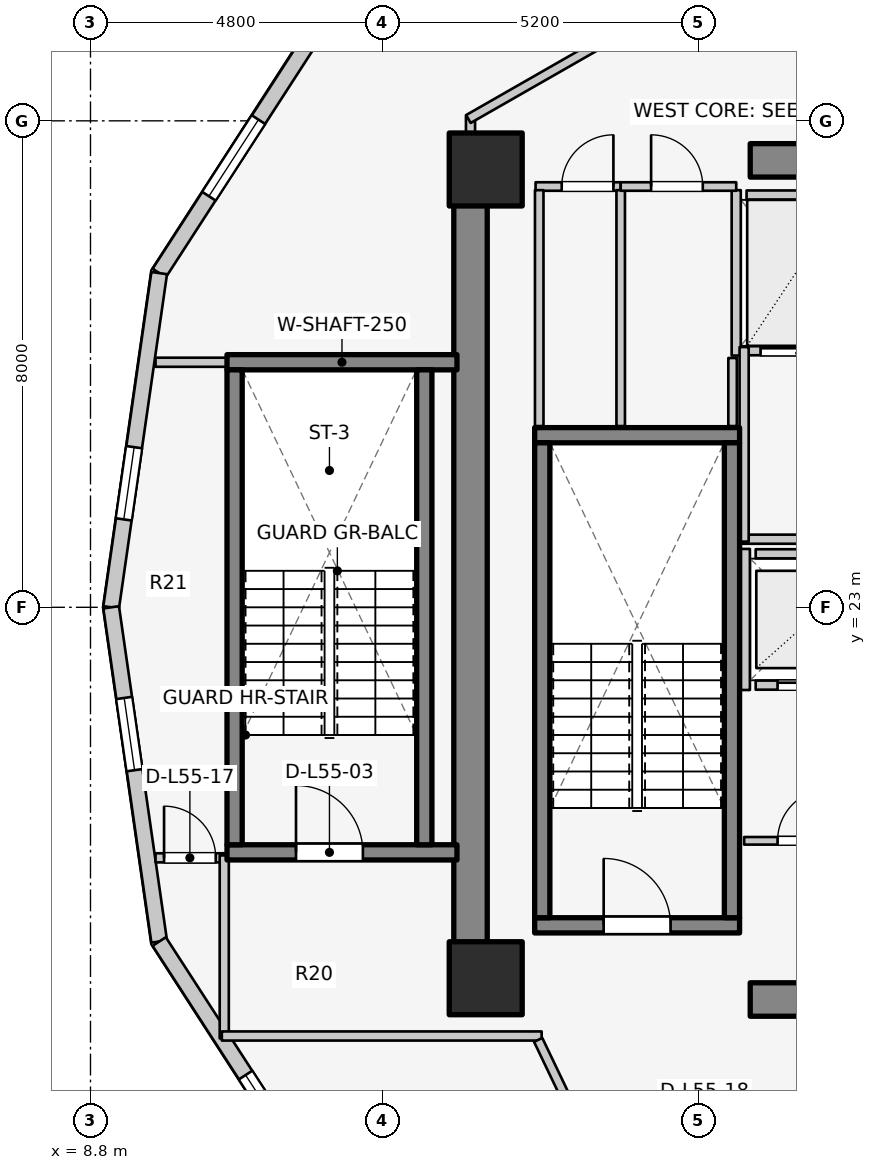
"""IFC4 building model, lengths in metres.
Left out: names, types, materials, properties, quantities, classifications, styles, units other than length and angle.
Written with IfcOpenShell. Run it as: python <this file> out.ifc"""

import sys

from ifc_helpers import new_model, si_unit, direction, frame, frame_2d, origin, origin_2d, place, context, subcontext, project, spatial, rectangle, extrude, element, fill, save


model = new_model("IFC4")
c1 = context("Model", 3, precision=1e-05, world=origin(), true_north=direction((0.0, 1.0)))
c2 = subcontext(c1, "Body", "Model", "MODEL_VIEW")
j1 = project(units=[si_unit("LENGTHUNIT", "METRE"), si_unit("PLANEANGLEUNIT", "RADIAN")], contexts=[c1])
p1 = place(None, origin())
s1 = spatial("IfcSite", under=j1, at=p1, CompositionType="ELEMENT")
p2 = place(p1, origin())
s2 = spatial("IfcBuilding", under=s1, at=p2, CompositionType="ELEMENT")
p3 = place(p2, frame((0.0, 0.0, 180.8)))
s3 = spatial("IfcBuildingStorey", under=s2, at=p3, CompositionType="ELEMENT", Elevation=180.8)
p4 = place(p3, frame((15.05, 17.05, 0.0), z_axis=(0.0, 0.0, 1.0), x_axis=(0.0, 1.0, 0.0)))
e1 = element("IfcWall", 1, at=p4, inside=s3, PredefinedType="SHEAR", context=c2, shape_type="SweptSolid", body=[
    extrude(rectangle(XDim=12.8, YDim=0.55, at=frame_2d((6.4, 0.0))), origin(), (0.0, 0.0, 1.0), 3.1),
])
for number, where, z_axis, x_axis in (
    (2, (19.65, 16.55, 0.0), (0.0, 0.0, 1.0), (1.0, 0.0, 0.0)),
    (3, (19.65, 30.35, 0.0), (0.0, 0.0, 1.0), (1.0, 0.0, 0.0)),
):
    element("IfcWall", number, at=place(p3, frame(where, z_axis=z_axis, x_axis=x_axis)), inside=s3, PredefinedType="SHEAR", context=c2, shape_type="SweptSolid", body=[
        extrude(rectangle(XDim=4.5, YDim=0.55, at=frame_2d((2.25, 0.0))), origin(), (0.0, 0.0, 1.0), 3.1),
    ])
p5 = place(p3, frame((16.105, 17.77, 0.0), z_axis=(0.0, 0.0, 1.0), x_axis=(1.0, 0.0, 0.0)))
e4 = element("IfcWall", 4, at=p5, inside=s3, PredefinedType="SOLIDWALL", context=c2, shape_type="SweptSolid", body=[
    extrude(rectangle(XDim=3.37, YDim=0.25, at=frame_2d((1.685, 0.0))), origin(), (0.0, 0.0, 1.0), 3.1),
])
p6 = place(p5, frame((1.135, 0.0, 0.0)))
e5 = element("IfcOpeningElement", 5, at=p6, cuts=e4, PredefinedType="OPENING", context=c2, shape_type="SweptSolid", body=[
    extrude(rectangle(XDim=1.1, YDim=2.1, at=frame_2d((0.55, 1.05))), frame((0.0, 0.135, 0.0), z_axis=(0.0, -1.0, 0.0), x_axis=(1.0, 0.0, 0.0)), (0.0, 0.0, 1.0), 0.27),
])
p7 = place(p3, frame((16.105, 25.83, 0.0), z_axis=(0.0, 0.0, 1.0), x_axis=(1.0, 0.0, 0.0)))
e6 = element("IfcWall", 6, at=p7, inside=s3, PredefinedType="SOLIDWALL", context=c2, shape_type="SweptSolid", body=[
    extrude(rectangle(XDim=3.37, YDim=0.25, at=frame_2d((1.685, 0.0))), origin(), (0.0, 0.0, 1.0), 3.1),
])
for number, where, z_axis, x_axis in (
    (7, (16.23, 17.895, 0.0), (0.0, 0.0, 1.0), (0.0, 1.0, 0.0)),
    (8, (19.35, 17.895, 0.0), (0.0, 0.0, 1.0), (0.0, 1.0, 0.0)),
):
    element("IfcWall", number, at=place(p3, frame(where, z_axis=z_axis, x_axis=x_axis)), inside=s3, PredefinedType="SOLIDWALL", context=c2, shape_type="SweptSolid", body=[
        extrude(rectangle(XDim=7.81, YDim=0.25, at=frame_2d((3.905, 0.0))), origin(), (0.0, 0.0, 1.0), 3.1),
    ])
p8 = place(p3, frame((11.045, 18.97, 0.0), z_axis=(0.0, 0.0, 1.0), x_axis=(1.0, 0.0, 0.0)))
e9 = element("IfcWall", 9, at=p8, inside=s3, PredefinedType="SOLIDWALL", context=c2, shape_type="SweptSolid", body=[
    extrude(rectangle(XDim=3.782, YDim=0.25, at=frame_2d((1.891, 0.0))), origin(), (0.0, 0.0, 1.0), 3.1),
])
p9 = place(p8, frame((1.135, 0.0, 0.0)))
e10 = element("IfcOpeningElement", 10, at=p9, cuts=e9, PredefinedType="OPENING", context=c2, shape_type="SweptSolid", body=[
    extrude(rectangle(XDim=1.1, YDim=2.1, at=frame_2d((0.55, 1.05))), frame((0.0, 0.135, 0.0), z_axis=(0.0, -1.0, 0.0), x_axis=(1.0, 0.0, 0.0)), (0.0, 0.0, 1.0), 0.27),
])
p10 = place(p3, frame((11.045, 27.03, 0.0), z_axis=(0.0, 0.0, 1.0), x_axis=(1.0, 0.0, 0.0)))
e11 = element("IfcWall", 11, at=p10, inside=s3, PredefinedType="SOLIDWALL", context=c2, shape_type="SweptSolid", body=[
    extrude(rectangle(XDim=3.782, YDim=0.25, at=frame_2d((1.891, 0.0))), origin(), (0.0, 0.0, 1.0), 3.1),
])
for number, where, z_axis, x_axis in (
    (12, (11.17, 19.095, 0.0), (0.0, 0.0, 1.0), (0.0, 1.0, 0.0)),
    (13, (14.29, 19.095, 0.0), (0.0, 0.0, 1.0), (0.0, 1.0, 0.0)),
):
    element("IfcWall", number, at=place(p3, frame(where, z_axis=z_axis, x_axis=x_axis)), inside=s3, PredefinedType="SOLIDWALL", context=c2, shape_type="SweptSolid", body=[
        extrude(rectangle(XDim=7.81, YDim=0.25, at=frame_2d((3.905, 0.0))), origin(), (0.0, 0.0, 1.0), 3.1),
    ])
for number, where, z_axis, x_axis in (
    (14, (15.3, 16.9, 0.0), (0.0, 0.0, 1.0), (1.0, 0.0, 0.0)),
    (15, (15.3, 30.2, 0.0), (0.0, 0.0, 1.0), (1.0, 0.0, 0.0)),
):
    element("IfcColumn", number, at=place(p3, frame(where, z_axis=z_axis, x_axis=x_axis)), inside=s3, PredefinedType="COLUMN", context=c2, shape_type="SweptSolid", body=[
        extrude(rectangle(XDim=1.2, YDim=1.2, at=origin_2d()), origin(), (0.0, 0.0, 1.0), 3.1),
    ])
p11 = place(p3, frame((12.381, 32.284, 0.0), z_axis=(0.0, 0.0, 1.0), x_axis=(-0.543358984534, -0.839500454989, 0.0)))
e16 = element("IfcWall", 16, at=p11, inside=s3, PredefinedType="STANDARD", context=c2, shape_type="SweptSolid", body=[
    extrude(rectangle(XDim=4.511, YDim=0.26, at=frame_2d((2.256, 0.0))), origin(), (0.0, 0.0, 1.0), 2.85),
])
p12 = place(p11, frame((1.506, 0.0, 0.75)))
e17 = element("IfcOpeningElement", 17, at=p12, cuts=e16, PredefinedType="OPENING", context=c2, shape_type="SweptSolid", body=[
    extrude(rectangle(XDim=1.5, YDim=1.6, at=frame_2d((0.75, 0.8))), frame((0.0, 0.14, 0.0), z_axis=(0.0, -1.0, 0.0), x_axis=(1.0, 0.0, 0.0)), (0.0, 0.0, 1.0), 0.28),
])
p13 = place(p3, frame((9.93, 28.497, 0.0), z_axis=(0.0, 0.0, 1.0), x_axis=(-0.142227632286, -0.989833976288, 0.0)))
e18 = element("IfcWall", 18, at=p13, inside=s3, PredefinedType="STANDARD", context=c2, shape_type="SweptSolid", body=[
    extrude(rectangle(XDim=5.553, YDim=0.26, at=frame_2d((2.776, 0.0))), origin(), (0.0, 0.0, 1.0), 2.85),
])
p14 = place(p13, frame((2.892, 0.0, 0.75)))
e19 = element("IfcOpeningElement", 19, at=p14, cuts=e18, PredefinedType="OPENING", context=c2, shape_type="SweptSolid", body=[
    extrude(rectangle(XDim=1.2, YDim=1.5, at=frame_2d((0.6, 0.75))), frame((0.0, 0.14, 0.0), z_axis=(0.0, -1.0, 0.0), x_axis=(1.0, 0.0, 0.0)), (0.0, 0.0, 1.0), 0.28),
])
p15 = place(p3, frame((9.14, 23.0, 0.0), z_axis=(0.0, 0.0, 1.0), x_axis=(0.142227632286, -0.989833976288, 0.0)))
e20 = element("IfcWall", 20, at=p15, inside=s3, PredefinedType="STANDARD", context=c2, shape_type="SweptSolid", body=[
    extrude(rectangle(XDim=5.553, YDim=0.26, at=frame_2d((2.776, 0.0))), origin(), (0.0, 0.0, 1.0), 2.85),
])
p16 = place(p15, frame((1.506, 0.0, 0.75)))
e21 = element("IfcOpeningElement", 21, at=p16, cuts=e20, PredefinedType="OPENING", context=c2, shape_type="SweptSolid", body=[
    extrude(rectangle(XDim=1.2, YDim=1.5, at=frame_2d((0.6, 0.75))), frame((0.0, 0.14, 0.0), z_axis=(0.0, -1.0, 0.0), x_axis=(1.0, 0.0, 0.0)), (0.0, 0.0, 1.0), 0.28),
])
p17 = place(p3, frame((9.93, 17.503, 0.0), z_axis=(0.0, 0.0, 1.0), x_axis=(0.543358984534, -0.839500454989, 0.0)))
e22 = element("IfcWall", 22, at=p17, inside=s3, PredefinedType="STANDARD", context=c2, shape_type="SweptSolid", body=[
    extrude(rectangle(XDim=4.511, YDim=0.26, at=frame_2d((2.256, 0.0))), origin(), (0.0, 0.0, 1.0), 2.85),
])
p18 = place(p17, frame((2.615, 0.0, 0.75)))
e23 = element("IfcOpeningElement", 23, at=p18, cuts=e22, PredefinedType="OPENING", context=c2, shape_type="SweptSolid", body=[
    extrude(rectangle(XDim=1.2, YDim=1.5, at=frame_2d((0.6, 0.75))), frame((0.0, 0.14, 0.0), z_axis=(0.0, -1.0, 0.0), x_axis=(1.0, 0.0, 0.0)), (0.0, 0.0, 1.0), 0.28),
])
p19 = place(p3, frame((19.74, 21.72, 0.0), z_axis=(0.0, 0.0, 1.0), x_axis=(1.0, 0.0, 0.0)))
e24 = element("IfcWall", 24, at=p19, inside=s3, PredefinedType="SOLIDWALL", context=c2, shape_type="SweptSolid", body=[
    extrude(rectangle(XDim=1.82, YDim=0.15, at=frame_2d((0.91, 0.0))), origin(), (0.0, 0.0, 1.0), 2.855),
])
p20 = place(p19, frame((0.36, 0.0, 0.0)))
e25 = element("IfcOpeningElement", 25, at=p20, cuts=e24, PredefinedType="OPENING", context=c2, shape_type="SweptSolid", body=[
    extrude(rectangle(XDim=1.1, YDim=2.1, at=frame_2d((0.55, 1.05))), frame((0.0, 0.085, 0.0), z_axis=(0.0, -1.0, 0.0), x_axis=(1.0, 0.0, 0.0)), (0.0, 0.0, 1.0), 0.17),
])
p21 = place(p3, frame((19.74, 23.88, 0.0), z_axis=(0.0, 0.0, 1.0), x_axis=(1.0, 0.0, 0.0)))
e26 = element("IfcWall", 26, at=p21, inside=s3, PredefinedType="SOLIDWALL", context=c2, shape_type="SweptSolid", body=[
    extrude(rectangle(XDim=1.82, YDim=0.15, at=frame_2d((0.91, 0.0))), origin(), (0.0, 0.0, 1.0), 2.855),
])
p22 = place(p3, frame((19.57, 21.64, 0.0), z_axis=(0.0, 0.0, 1.0), x_axis=(0.0, 1.0, 0.0)))
e27 = element("IfcWall", 27, at=p22, inside=s3, PredefinedType="SOLIDWALL", context=c2, shape_type="SweptSolid", body=[
    extrude(rectangle(XDim=2.32, YDim=0.15, at=frame_2d((1.16, 0.0))), origin(), (0.0, 0.0, 1.0), 2.855),
])
p23 = place(p3, frame((19.59, 27.22, 0.0), z_axis=(0.0, 0.0, 1.0), x_axis=(1.0, 0.0, 0.0)))
e28 = element("IfcWall", 28, at=p23, inside=s3, PredefinedType="SOLIDWALL", context=c2, shape_type="SweptSolid", body=[
    extrude(rectangle(XDim=1.76, YDim=0.15, at=frame_2d((0.88, 0.0))), origin(), (0.0, 0.0, 1.0), 2.855),
])
p24 = place(p23, frame((0.23, 0.0, 0.0)))
e29 = element("IfcOpeningElement", 29, at=p24, cuts=e28, PredefinedType="OPENING", context=c2, shape_type="SweptSolid", body=[
    extrude(rectangle(XDim=1.3, YDim=2.1, at=frame_2d((0.65, 1.05))), frame((0.0, 0.085, 0.0), z_axis=(0.0, -1.0, 0.0), x_axis=(1.0, 0.0, 0.0)), (0.0, 0.0, 1.0), 0.17),
])
p25 = place(p3, frame((19.59, 29.78, 0.0), z_axis=(0.0, 0.0, 1.0), x_axis=(1.0, 0.0, 0.0)))
e30 = element("IfcWall", 30, at=p25, inside=s3, PredefinedType="SOLIDWALL", context=c2, shape_type="SweptSolid", body=[
    extrude(rectangle(XDim=1.76, YDim=0.15, at=frame_2d((0.88, 0.0))), origin(), (0.0, 0.0, 1.0), 2.855),
])
p26 = place(p3, frame((19.42, 27.14, 0.0), z_axis=(0.0, 0.0, 1.0), x_axis=(0.0, 1.0, 0.0)))
e31 = element("IfcWall", 31, at=p26, inside=s3, PredefinedType="SOLIDWALL", context=c2, shape_type="SweptSolid", body=[
    extrude(rectangle(XDim=2.72, YDim=0.15, at=frame_2d((1.36, 0.0))), origin(), (0.0, 0.0, 1.0), 2.855),
])
p27 = place(p3, frame((19.52, 24.12, 0.0), z_axis=(0.0, 0.0, 1.0), x_axis=(1.0, 0.0, 0.0)))
e32 = element("IfcWall", 32, at=p27, inside=s3, PredefinedType="PARTITIONING", context=c2, shape_type="SweptSolid", body=[
    extrude(rectangle(XDim=5.08, YDim=0.15, at=frame_2d((2.54, 0.0))), origin(), (0.0, 0.0, 1.0), 2.12),
])
p28 = place(p3, frame((19.55, 24.08, 0.0), z_axis=(0.0, 0.0, 1.0), x_axis=(0.0, 1.0, 0.0)))
e33 = element("IfcWall", 33, at=p28, inside=s3, PredefinedType="PARTITIONING", context=c2, shape_type="SweptSolid", body=[
    extrude(rectangle(XDim=3.2, YDim=0.15, at=frame_2d((1.6, 0.0))), origin(), (0.0, 0.0, 1.0), 2.855),
])
p29 = place(p3, frame((19.55, 19.16, 0.0), z_axis=(0.0, 0.0, 1.0), x_axis=(1.0, 0.0, 0.0)))
e34 = element("IfcWall", 34, at=p29, inside=s3, PredefinedType="PARTITIONING", context=c2, shape_type="SweptSolid", body=[
    extrude(rectangle(XDim=4.87, YDim=0.125, at=frame_2d((2.435, 0.0))), origin(), (0.0, 0.0, 1.0), 2.12),
])
p30 = place(p29, frame((0.55, 0.0, 0.0)))
e35 = element("IfcOpeningElement", 35, at=p30, cuts=e34, PredefinedType="OPENING", context=c2, shape_type="SweptSolid", body=[
    extrude(rectangle(XDim=0.85, YDim=2.05, at=frame_2d((0.425, 1.025))), frame((0.0, 0.073, 0.0), z_axis=(0.0, -1.0, 0.0), x_axis=(1.0, 0.0, 0.0)), (0.0, 0.0, 1.0), 0.145),
])
p31 = place(p3, frame((16.12, 29.92, 0.0), z_axis=(0.0, 0.0, 1.0), x_axis=(1.0, 0.0, 0.0)))
e36 = element("IfcWall", 36, at=p31, inside=s3, PredefinedType="PLUMBINGWALL", context=c2, shape_type="SweptSolid", body=[
    extrude(rectangle(XDim=1.4, YDim=0.14, at=frame_2d((0.7, 0.0))), origin(), (0.0, 0.0, 1.0), 2.855),
])
p32 = place(p31, frame((0.43, 0.0, 0.0)))
e37 = element("IfcOpeningElement", 37, at=p32, cuts=e36, PredefinedType="OPENING", context=c2, shape_type="SweptSolid", body=[
    extrude(rectangle(XDim=0.85, YDim=2.05, at=frame_2d((0.425, 1.025))), frame((0.0, 0.08, 0.0), z_axis=(0.0, -1.0, 0.0), x_axis=(1.0, 0.0, 0.0)), (0.0, 0.0, 1.0), 0.16),
])
for number, where, z_axis, x_axis in (
    (38, (16.18, 25.98, 0.0), (0.0, 0.0, 1.0), (0.0, 1.0, 0.0)),
    (39, (17.52, 25.98, 0.0), (0.0, 0.0, 1.0), (0.0, 1.0, 0.0)),
):
    element("IfcWall", number, at=place(p3, frame(where, z_axis=z_axis, x_axis=x_axis)), inside=s3, PredefinedType="PLUMBINGWALL", context=c2, shape_type="SweptSolid", body=[
        extrude(rectangle(XDim=3.88, YDim=0.14, at=frame_2d((1.94, 0.0))), origin(), (0.0, 0.0, 1.0), 2.855),
    ])
p33 = place(p3, frame((17.52, 29.92, 0.0), z_axis=(0.0, 0.0, 1.0), x_axis=(1.0, 0.0, 0.0)))
e40 = element("IfcWall", 40, at=p33, inside=s3, PredefinedType="PLUMBINGWALL", context=c2, shape_type="SweptSolid", body=[
    extrude(rectangle(XDim=1.9, YDim=0.14, at=frame_2d((0.95, 0.0))), origin(), (0.0, 0.0, 1.0), 2.855),
])
p34 = place(p33, frame((0.5, 0.0, 0.0)))
e41 = element("IfcOpeningElement", 41, at=p34, cuts=e40, PredefinedType="OPENING", context=c2, shape_type="SweptSolid", body=[
    extrude(rectangle(XDim=0.85, YDim=2.05, at=frame_2d((0.425, 1.025))), frame((0.0, 0.08, 0.0), z_axis=(0.0, -1.0, 0.0), x_axis=(1.0, 0.0, 0.0)), (0.0, 0.0, 1.0), 0.16),
])
p35 = place(p3, frame((19.36, 25.98, 0.0), z_axis=(0.0, 0.0, 1.0), x_axis=(0.0, 1.0, 0.0)))
e42 = element("IfcWall", 42, at=p35, inside=s3, PredefinedType="PLUMBINGWALL", context=c2, shape_type="SweptSolid", body=[
    extrude(rectangle(XDim=1.12, YDim=0.14, at=frame_2d((0.56, 0.0))), origin(), (0.0, 0.0, 1.0), 2.855),
])
p36 = place(p3, frame((9.87, 27.03, 0.0), z_axis=(0.0, 0.0, 1.0), x_axis=(1.0, 0.0, 0.0)))
e43 = element("IfcWall", 43, at=p36, inside=s3, PredefinedType="PARTITIONING", context=c2, shape_type="SweptSolid", body=[
    extrude(rectangle(XDim=1.17, YDim=0.15, at=frame_2d((0.585, 0.0))), origin(), (0.0, 0.0, 1.0), 2.855),
])
p37 = place(p3, frame((15.05, 29.8, 0.0), z_axis=(0.0, 0.0, 1.0), x_axis=(0.0, 1.0, 0.0)))
e44 = element("IfcWall", 44, at=p37, inside=s3, PredefinedType="PARTITIONING", context=c2, shape_type="SweptSolid", body=[
    extrude(rectangle(XDim=1.29, YDim=0.15, at=frame_2d((0.645, 0.0))), origin(), (0.0, 0.0, 1.0), 2.855),
])
p38 = place(p3, frame((17.243, 32.305, 0.0), z_axis=(0.0, 0.0, 1.0), x_axis=(-0.867991349648, -0.496579315857, 0.0)))
e45 = element("IfcWall", 45, at=p38, inside=s3, PredefinedType="PARTITIONING", context=c2, shape_type="SweptSolid", body=[
    extrude(rectangle(XDim=2.567, YDim=0.15, at=frame_2d((1.283, 0.0))), origin(), (0.0, 0.0, 1.0), 2.22),
])
p39 = place(p3, frame((9.87, 18.88, 0.0), z_axis=(0.0, 0.0, 1.0), x_axis=(1.0, 0.0, 0.0)))
e46 = element("IfcWall", 46, at=p39, inside=s3, PredefinedType="PARTITIONING", context=c2, shape_type="SweptSolid", body=[
    extrude(rectangle(XDim=1.17, YDim=0.15, at=frame_2d((0.585, 0.0))), origin(), (0.0, 0.0, 1.0), 2.855),
])
p40 = place(p39, frame((0.14, 0.0, 0.0)))
e47 = element("IfcOpeningElement", 47, at=p40, cuts=e46, PredefinedType="OPENING", context=c2, shape_type="SweptSolid", body=[
    extrude(rectangle(XDim=0.85, YDim=2.05, at=frame_2d((0.425, 1.025))), frame((0.0, 0.085, 0.0), z_axis=(0.0, -1.0, 0.0), x_axis=(1.0, 0.0, 0.0)), (0.0, 0.0, 1.0), 0.17),
])
p41 = place(p3, frame((11.0, 15.91, 0.0), z_axis=(0.0, 0.0, 1.0), x_axis=(0.0, 1.0, 0.0)))
e48 = element("IfcWall", 48, at=p41, inside=s3, PredefinedType="PARTITIONING", context=c2, shape_type="SweptSolid", body=[
    extrude(rectangle(XDim=3.01, YDim=0.15, at=frame_2d((1.505, 0.0))), origin(), (0.0, 0.0, 1.0), 2.855),
])
p42 = place(p3, frame((10.96, 15.95, 0.0), z_axis=(0.0, 0.0, 1.0), x_axis=(1.0, 0.0, 0.0)))
e49 = element("IfcWall", 49, at=p42, inside=s3, PredefinedType="PARTITIONING", context=c2, shape_type="SweptSolid", body=[
    extrude(rectangle(XDim=5.26, YDim=0.15, at=frame_2d((2.63, 0.0))), origin(), (0.0, 0.0, 1.0), 2.22),
])
p43 = place(p3, frame((17.222, 13.675, 0.0), z_axis=(0.0, 0.0, 1.0), x_axis=(-0.431973389813, 0.901886351207, 0.0)))
e50 = element("IfcWall", 50, at=p43, inside=s3, PredefinedType="PARTITIONING", context=c2, shape_type="SweptSolid", body=[
    extrude(rectangle(XDim=2.452, YDim=0.15, at=frame_2d((1.226, 0.0))), origin(), (0.0, 0.0, 1.0), 2.855),
])
p44 = place(p12, origin())
e51 = element("IfcWindow", 51, at=p44, inside=s3, PartitioningType="SINGLE_PANEL", PredefinedType="WINDOW", context=c2, shape_type="SweptSolid", body=[
    extrude(rectangle(XDim=1.5, YDim=1.6, at=frame_2d((0.75, 0.8))), frame((0.0, 0.03, 0.0), z_axis=(0.0, -1.0, 0.0), x_axis=(1.0, 0.0, 0.0)), (0.0, 0.0, 1.0), 0.06),
])
fill(e17, e51)
p45 = place(p14, origin())
e52 = element("IfcWindow", 52, at=p45, inside=s3, PartitioningType="SINGLE_PANEL", PredefinedType="WINDOW", context=c2, shape_type="SweptSolid", body=[
    extrude(rectangle(XDim=1.2, YDim=1.5, at=frame_2d((0.6, 0.75))), frame((0.0, 0.03, 0.0), z_axis=(0.0, -1.0, 0.0), x_axis=(1.0, 0.0, 0.0)), (0.0, 0.0, 1.0), 0.06),
])
fill(e19, e52)
p46 = place(p16, origin())
e53 = element("IfcWindow", 53, at=p46, inside=s3, PartitioningType="SINGLE_PANEL", PredefinedType="WINDOW", context=c2, shape_type="SweptSolid", body=[
    extrude(rectangle(XDim=1.2, YDim=1.5, at=frame_2d((0.6, 0.75))), frame((0.0, 0.03, 0.0), z_axis=(0.0, -1.0, 0.0), x_axis=(1.0, 0.0, 0.0)), (0.0, 0.0, 1.0), 0.06),
])
fill(e21, e53)
p47 = place(p18, origin())
e54 = element("IfcWindow", 54, at=p47, inside=s3, PartitioningType="SINGLE_PANEL", PredefinedType="WINDOW", context=c2, shape_type="SweptSolid", body=[
    extrude(rectangle(XDim=1.2, YDim=1.5, at=frame_2d((0.6, 0.75))), frame((0.0, 0.03, 0.0), z_axis=(0.0, -1.0, 0.0), x_axis=(1.0, 0.0, 0.0)), (0.0, 0.0, 1.0), 0.06),
])
fill(e23, e54)
p48 = place(p6, origin())
e55 = element("IfcDoor", 55, at=p48, inside=s3, OperationType="SINGLE_SWING_LEFT", PredefinedType="DOOR", context=c2, shape_type="SweptSolid", body=[
    extrude(rectangle(XDim=1.1, YDim=2.1, at=frame_2d((0.55, 1.05))), frame((0.0, 0.025, 0.0), z_axis=(0.0, -1.0, 0.0), x_axis=(1.0, 0.0, 0.0)), (0.0, 0.0, 1.0), 0.05),
])
fill(e5, e55)
p49 = place(p9, origin())
e56 = element("IfcDoor", 56, at=p49, inside=s3, OperationType="SINGLE_SWING_LEFT", PredefinedType="DOOR", context=c2, shape_type="SweptSolid", body=[
    extrude(rectangle(XDim=1.1, YDim=2.1, at=frame_2d((0.55, 1.05))), frame((0.0, 0.025, 0.0), z_axis=(0.0, -1.0, 0.0), x_axis=(1.0, 0.0, 0.0)), (0.0, 0.0, 1.0), 0.05),
])
fill(e10, e56)
p50 = place(p20, origin())
e57 = element("IfcDoor", 57, at=p50, inside=s3, OperationType="DOUBLE_DOOR_SLIDING", PredefinedType="DOOR", context=c2, shape_type="SweptSolid", body=[
    extrude(rectangle(XDim=1.1, YDim=2.1, at=frame_2d((0.55, 1.05))), frame((0.0, 0.025, 0.0), z_axis=(0.0, -1.0, 0.0), x_axis=(1.0, 0.0, 0.0)), (0.0, 0.0, 1.0), 0.05),
])
fill(e25, e57)
p51 = place(p24, origin())
e58 = element("IfcDoor", 58, at=p51, inside=s3, OperationType="DOUBLE_DOOR_SLIDING", PredefinedType="DOOR", context=c2, shape_type="SweptSolid", body=[
    extrude(rectangle(XDim=1.3, YDim=2.1, at=frame_2d((0.65, 1.05))), frame((0.0, 0.025, 0.0), z_axis=(0.0, -1.0, 0.0), x_axis=(1.0, 0.0, 0.0)), (0.0, 0.0, 1.0), 0.05),
])
fill(e29, e58)
p52 = place(p30, origin())
e59 = element("IfcDoor", 59, at=p52, inside=s3, OperationType="SINGLE_SWING_RIGHT", PredefinedType="DOOR", context=c2, shape_type="SweptSolid", body=[
    extrude(rectangle(XDim=0.85, YDim=2.05, at=frame_2d((0.425, 1.025))), frame((0.0, 0.025, 0.0), z_axis=(0.0, -1.0, 0.0), x_axis=(1.0, 0.0, 0.0)), (0.0, 0.0, 1.0), 0.05),
])
fill(e35, e59)
p53 = place(p32, origin())
e60 = element("IfcDoor", 60, at=p53, inside=s3, OperationType="SINGLE_SWING_RIGHT", PredefinedType="DOOR", context=c2, shape_type="SweptSolid", body=[
    extrude(rectangle(XDim=0.85, YDim=2.05, at=frame_2d((0.425, 1.025))), frame((0.0, 0.025, 0.0), z_axis=(0.0, -1.0, 0.0), x_axis=(1.0, 0.0, 0.0)), (0.0, 0.0, 1.0), 0.05),
])
fill(e37, e60)
p54 = place(p34, origin())
e61 = element("IfcDoor", 61, at=p54, inside=s3, OperationType="SINGLE_SWING_LEFT", PredefinedType="DOOR", context=c2, shape_type="SweptSolid", body=[
    extrude(rectangle(XDim=0.85, YDim=2.05, at=frame_2d((0.425, 1.025))), frame((0.0, 0.025, 0.0), z_axis=(0.0, -1.0, 0.0), x_axis=(1.0, 0.0, 0.0)), (0.0, 0.0, 1.0), 0.05),
])
fill(e41, e61)
p55 = place(p40, origin())
e62 = element("IfcDoor", 62, at=p55, inside=s3, OperationType="SINGLE_SWING_LEFT", PredefinedType="DOOR", context=c2, shape_type="SweptSolid", body=[
    extrude(rectangle(XDim=0.85, YDim=2.05, at=frame_2d((0.425, 1.025))), frame((0.0, 0.025, 0.0), z_axis=(0.0, -1.0, 0.0), x_axis=(1.0, 0.0, 0.0)), (0.0, 0.0, 1.0), 0.05),
])
fill(e47, e62)
save(model, sys.argv[1])
